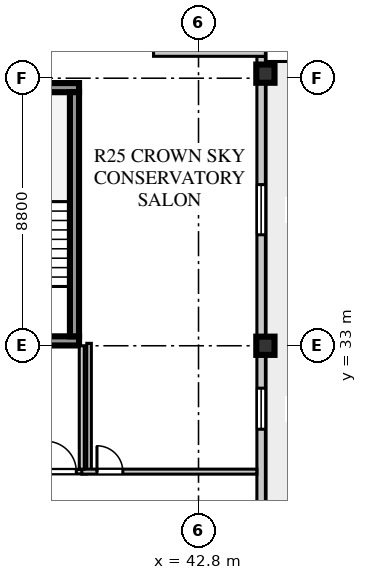
"""IFC4 building model, lengths in metres.
Left out: names, types, materials, properties, quantities, classifications, styles, units other than length and angle.
Written with IfcOpenShell. Run it as: python <this file> out.ifc"""

import sys

from ifc_helpers import new_model, si_unit, direction, frame, frame_2d, origin, origin_2d, place, context, subcontext, project, spatial, rectangle, extrude, element, fill, save


model = new_model("IFC4")
c1 = context("Model", 3, precision=1e-05, world=origin(), true_north=direction((0.0, 1.0)))
c2 = subcontext(c1, "Body", "Model", "MODEL_VIEW")
j1 = project(units=[si_unit("LENGTHUNIT", "METRE"), si_unit("PLANEANGLEUNIT", "RADIAN")], contexts=[c1])
p1 = place(None, origin())
s1 = spatial("IfcSite", under=j1, at=p1, CompositionType="ELEMENT")
p2 = place(p1, origin())
s2 = spatial("IfcBuilding", under=s1, at=p2, CompositionType="ELEMENT")
p3 = place(p2, frame((0.0, 0.0, 327.7)))
s3 = spatial("IfcBuildingStorey", under=s2, at=p3, CompositionType="ELEMENT", Elevation=327.7)
p4 = place(p3, frame((34.125, 33.16, 0.0), z_axis=(0.0, 0.0, 1.0), x_axis=(1.0, 0.0, 0.0)))
e1 = element("IfcWall", 1, at=p4, inside=s3, PredefinedType="SHEAR", context=c2, shape_type="SweptSolid", body=[
    extrude(rectangle(XDim=4.745, YDim=0.3, at=frame_2d((2.373, 0.0))), origin(), (0.0, 0.0, 1.0), 3.56),
])
p5 = place(p3, frame((34.83, 41.49, 0.0), z_axis=(0.0, 0.0, 1.0), x_axis=(1.0, 0.0, 0.0)))
e2 = element("IfcWall", 2, at=p5, inside=s3, PredefinedType="SHEAR", context=c2, shape_type="SweptSolid", body=[
    extrude(rectangle(XDim=4.04, YDim=0.3, at=frame_2d((2.02, 0.0))), origin(), (0.0, 0.0, 1.0), 3.56),
])
p6 = place(p3, frame((38.72, 33.31, 0.0), z_axis=(0.0, 0.0, 1.0), x_axis=(0.0, 1.0, 0.0)))
e3 = element("IfcWall", 3, at=p6, inside=s3, PredefinedType="SHEAR", context=c2, shape_type="SweptSolid", body=[
    extrude(rectangle(XDim=8.03, YDim=0.3, at=frame_2d((4.015, 0.0))), origin(), (0.0, 0.0, 1.0), 3.56),
])
for number, where, z_axis, x_axis in (
    (4, (45.0, 33.0, 0.0), (0.0, 0.0, 1.0), (1.0, 0.0, 0.0)),
    (5, (45.0, 41.95, 0.0), (0.0, 0.0, 1.0), (1.0, 0.0, 0.0)),
):
    element("IfcColumn", number, at=place(p3, frame(where, z_axis=z_axis, x_axis=x_axis)), inside=s3, PredefinedType="COLUMN", context=c2, shape_type="SweptSolid", body=[
        extrude(rectangle(XDim=0.6, YDim=0.6, at=origin_2d()), origin(), (0.0, 0.0, 1.0), 3.56),
    ])
p7 = place(p3, frame((44.86, 14.68, 0.0), z_axis=(0.0, 0.0, 1.0), x_axis=(0.0, 1.0, 0.0)))
e6 = element("IfcWall", 6, at=p7, inside=s3, PredefinedType="STANDARD", context=c2, shape_type="SweptSolid", body=[
    extrude(rectangle(XDim=27.84, YDim=0.28, at=frame_2d((13.92, 0.0))), origin(), (0.0, 0.0, 1.0), 2.92),
])
p8 = place(p7, frame((1.3, 0.0, 0.0)))
e7 = element("IfcOpeningElement", 7, at=p8, cuts=e6, PredefinedType="OPENING", context=c2, shape_type="SweptSolid", body=[
    extrude(rectangle(XDim=1.2, YDim=2.05, at=frame_2d((0.6, 1.025))), frame((0.0, 0.15, 0.0), z_axis=(0.0, -1.0, 0.0), x_axis=(1.0, 0.0, 0.0)), (0.0, 0.0, 1.0), 0.3),
])
p9 = place(p7, frame((3.703, 0.0, 0.8)))
e8 = element("IfcOpeningElement", 8, at=p9, cuts=e6, PredefinedType="OPENING", context=c2, shape_type="SweptSolid", body=[
    extrude(rectangle(XDim=1.2, YDim=1.75, at=frame_2d((0.6, 0.875))), frame((0.0, 0.15, 0.0), z_axis=(0.0, -1.0, 0.0), x_axis=(1.0, 0.0, 0.0)), (0.0, 0.0, 1.0), 0.3),
])
p10 = place(p7, frame((7.303, 0.0, 0.8)))
e9 = element("IfcOpeningElement", 9, at=p10, cuts=e6, PredefinedType="OPENING", context=c2, shape_type="SweptSolid", body=[
    extrude(rectangle(XDim=1.2, YDim=1.75, at=frame_2d((0.6, 0.875))), frame((0.0, 0.15, 0.0), z_axis=(0.0, -1.0, 0.0), x_axis=(1.0, 0.0, 0.0)), (0.0, 0.0, 1.0), 0.3),
])
p11 = place(p7, frame((10.445, 0.0, 0.8)))
e10 = element("IfcOpeningElement", 10, at=p11, cuts=e6, PredefinedType="OPENING", context=c2, shape_type="SweptSolid", body=[
    extrude(rectangle(XDim=1.2, YDim=1.75, at=frame_2d((0.6, 0.875))), frame((0.0, 0.15, 0.0), z_axis=(0.0, -1.0, 0.0), x_axis=(1.0, 0.0, 0.0)), (0.0, 0.0, 1.0), 0.3),
])
p12 = place(p7, frame((15.575, 0.0, 0.8)))
e11 = element("IfcOpeningElement", 11, at=p12, cuts=e6, PredefinedType="OPENING", context=c2, shape_type="SweptSolid", body=[
    extrude(rectangle(XDim=1.35, YDim=1.9, at=frame_2d((0.675, 0.95))), frame((0.0, 0.15, 0.0), z_axis=(0.0, -1.0, 0.0), x_axis=(1.0, 0.0, 0.0)), (0.0, 0.0, 1.0), 0.3),
])
p13 = place(p7, frame((21.97, 0.0, 0.8)))
e12 = element("IfcOpeningElement", 12, at=p13, cuts=e6, PredefinedType="OPENING", context=c2, shape_type="SweptSolid", body=[
    extrude(rectangle(XDim=1.65, YDim=1.95, at=frame_2d((0.825, 0.975))), frame((0.0, 0.15, 0.0), z_axis=(0.0, -1.0, 0.0), x_axis=(1.0, 0.0, 0.0)), (0.0, 0.0, 1.0), 0.3),
])
p14 = place(p3, frame((45.0, 42.66, 0.0), z_axis=(0.0, 0.0, 1.0), x_axis=(-1.0, 0.0, 0.0)))
e13 = element("IfcWall", 13, at=p14, inside=s3, PredefinedType="STANDARD", context=c2, shape_type="SweptSolid", body=[
    extrude(rectangle(XDim=3.68, YDim=0.28, at=frame_2d((1.84, 0.0))), origin(), (0.0, 0.0, 1.0), 2.92),
])
p15 = place(p3, frame((39.2, 28.86, 0.0), z_axis=(0.0, 0.0, 1.0), x_axis=(0.0, 1.0, 0.0)))
e14 = element("IfcWall", 14, at=p15, inside=s3, PredefinedType="PARTITIONING", context=c2, shape_type="SweptSolid", body=[
    extrude(rectangle(XDim=4.22, YDim=0.15, at=frame_2d((2.11, 0.0))), origin(), (0.0, 0.0, 1.0), 3.56),
])
p16 = place(p3, frame((37.48, 28.86, 0.0), z_axis=(0.0, 0.0, 1.0), x_axis=(1.0, 0.0, 0.0)))
e15 = element("IfcWall", 15, at=p16, inside=s3, PredefinedType="PARTITIONING", context=c2, shape_type="SweptSolid", body=[
    extrude(rectangle(XDim=1.64, YDim=0.15, at=frame_2d((0.82, 0.0))), origin(), (0.0, 0.0, 1.0), 3.56),
])
p17 = place(p16, frame((0.3, 0.0, 0.0)))
e16 = element("IfcOpeningElement", 16, at=p17, cuts=e15, PredefinedType="OPENING", context=c2, shape_type="SweptSolid", body=[
    extrude(rectangle(XDim=1.0, YDim=2.1, at=frame_2d((0.5, 1.05))), frame((0.0, 0.085, 0.0), z_axis=(0.0, -1.0, 0.0), x_axis=(1.0, 0.0, 0.0)), (0.0, 0.0, 1.0), 0.17),
])
p18 = place(p3, frame((38.96, 28.86, 0.0), z_axis=(0.0, 0.0, 1.0), x_axis=(1.0, 0.0, 0.0)))
e17 = element("IfcWall", 17, at=p18, inside=s3, PredefinedType="PARTITIONING", context=c2, shape_type="SweptSolid", body=[
    extrude(rectangle(XDim=5.76, YDim=0.165, at=frame_2d((2.88, 0.0))), origin(), (0.0, 0.0, 1.0), 3.56),
])
p19 = place(p18, frame((0.5, 0.0, 0.0)))
e18 = element("IfcOpeningElement", 18, at=p19, cuts=e17, PredefinedType="OPENING", context=c2, shape_type="SweptSolid", body=[
    extrude(rectangle(XDim=0.85, YDim=2.05, at=frame_2d((0.425, 1.025))), frame((0.0, 0.093, 0.0), z_axis=(0.0, -1.0, 0.0), x_axis=(1.0, 0.0, 0.0)), (0.0, 0.0, 1.0), 0.185),
])
p20 = place(p3, frame((38.96, 28.94, 0.0), z_axis=(0.0, 0.0, 1.0), x_axis=(0.0, 1.0, 0.0)))
e19 = element("IfcWall", 19, at=p20, inside=s3, PredefinedType="PARTITIONING", context=c2, shape_type="SweptSolid", body=[
    extrude(rectangle(XDim=4.06, YDim=0.165, at=frame_2d((2.03, 0.0))), origin(), (0.0, 0.0, 1.0), 3.56),
])
p21 = place(p12, origin())
e20 = element("IfcWindow", 20, at=p21, inside=s3, PartitioningType="SINGLE_PANEL", PredefinedType="WINDOW", context=c2, shape_type="SweptSolid", body=[
    extrude(rectangle(XDim=1.35, YDim=1.9, at=frame_2d((0.675, 0.95))), frame((0.0, 0.03, 0.0), z_axis=(0.0, -1.0, 0.0), x_axis=(1.0, 0.0, 0.0)), (0.0, 0.0, 1.0), 0.06),
])
fill(e11, e20)
p22 = place(p13, origin())
e21 = element("IfcWindow", 21, at=p22, inside=s3, PartitioningType="SINGLE_PANEL", PredefinedType="WINDOW", context=c2, shape_type="SweptSolid", body=[
    extrude(rectangle(XDim=1.65, YDim=1.95, at=frame_2d((0.825, 0.975))), frame((0.0, 0.03, 0.0), z_axis=(0.0, -1.0, 0.0), x_axis=(1.0, 0.0, 0.0)), (0.0, 0.0, 1.0), 0.06),
])
fill(e12, e21)
p23 = place(p17, origin())
e22 = element("IfcDoor", 22, at=p23, inside=s3, OperationType="SINGLE_SWING_LEFT", PredefinedType="DOOR", context=c2, shape_type="SweptSolid", body=[
    extrude(rectangle(XDim=1.0, YDim=2.1, at=frame_2d((0.5, 1.05))), frame((0.0, 0.025, 0.0), z_axis=(0.0, -1.0, 0.0), x_axis=(1.0, 0.0, 0.0)), (0.0, 0.0, 1.0), 0.05),
])
fill(e16, e22)
p24 = place(p19, origin())
e23 = element("IfcDoor", 23, at=p24, inside=s3, OperationType="SINGLE_SWING_LEFT", PredefinedType="DOOR", context=c2, shape_type="SweptSolid", body=[
    extrude(rectangle(XDim=0.85, YDim=2.05, at=frame_2d((0.425, 1.025))), frame((0.0, 0.025, 0.0), z_axis=(0.0, -1.0, 0.0), x_axis=(1.0, 0.0, 0.0)), (0.0, 0.0, 1.0), 0.05),
])
fill(e18, e23)
save(model, sys.argv[1])
